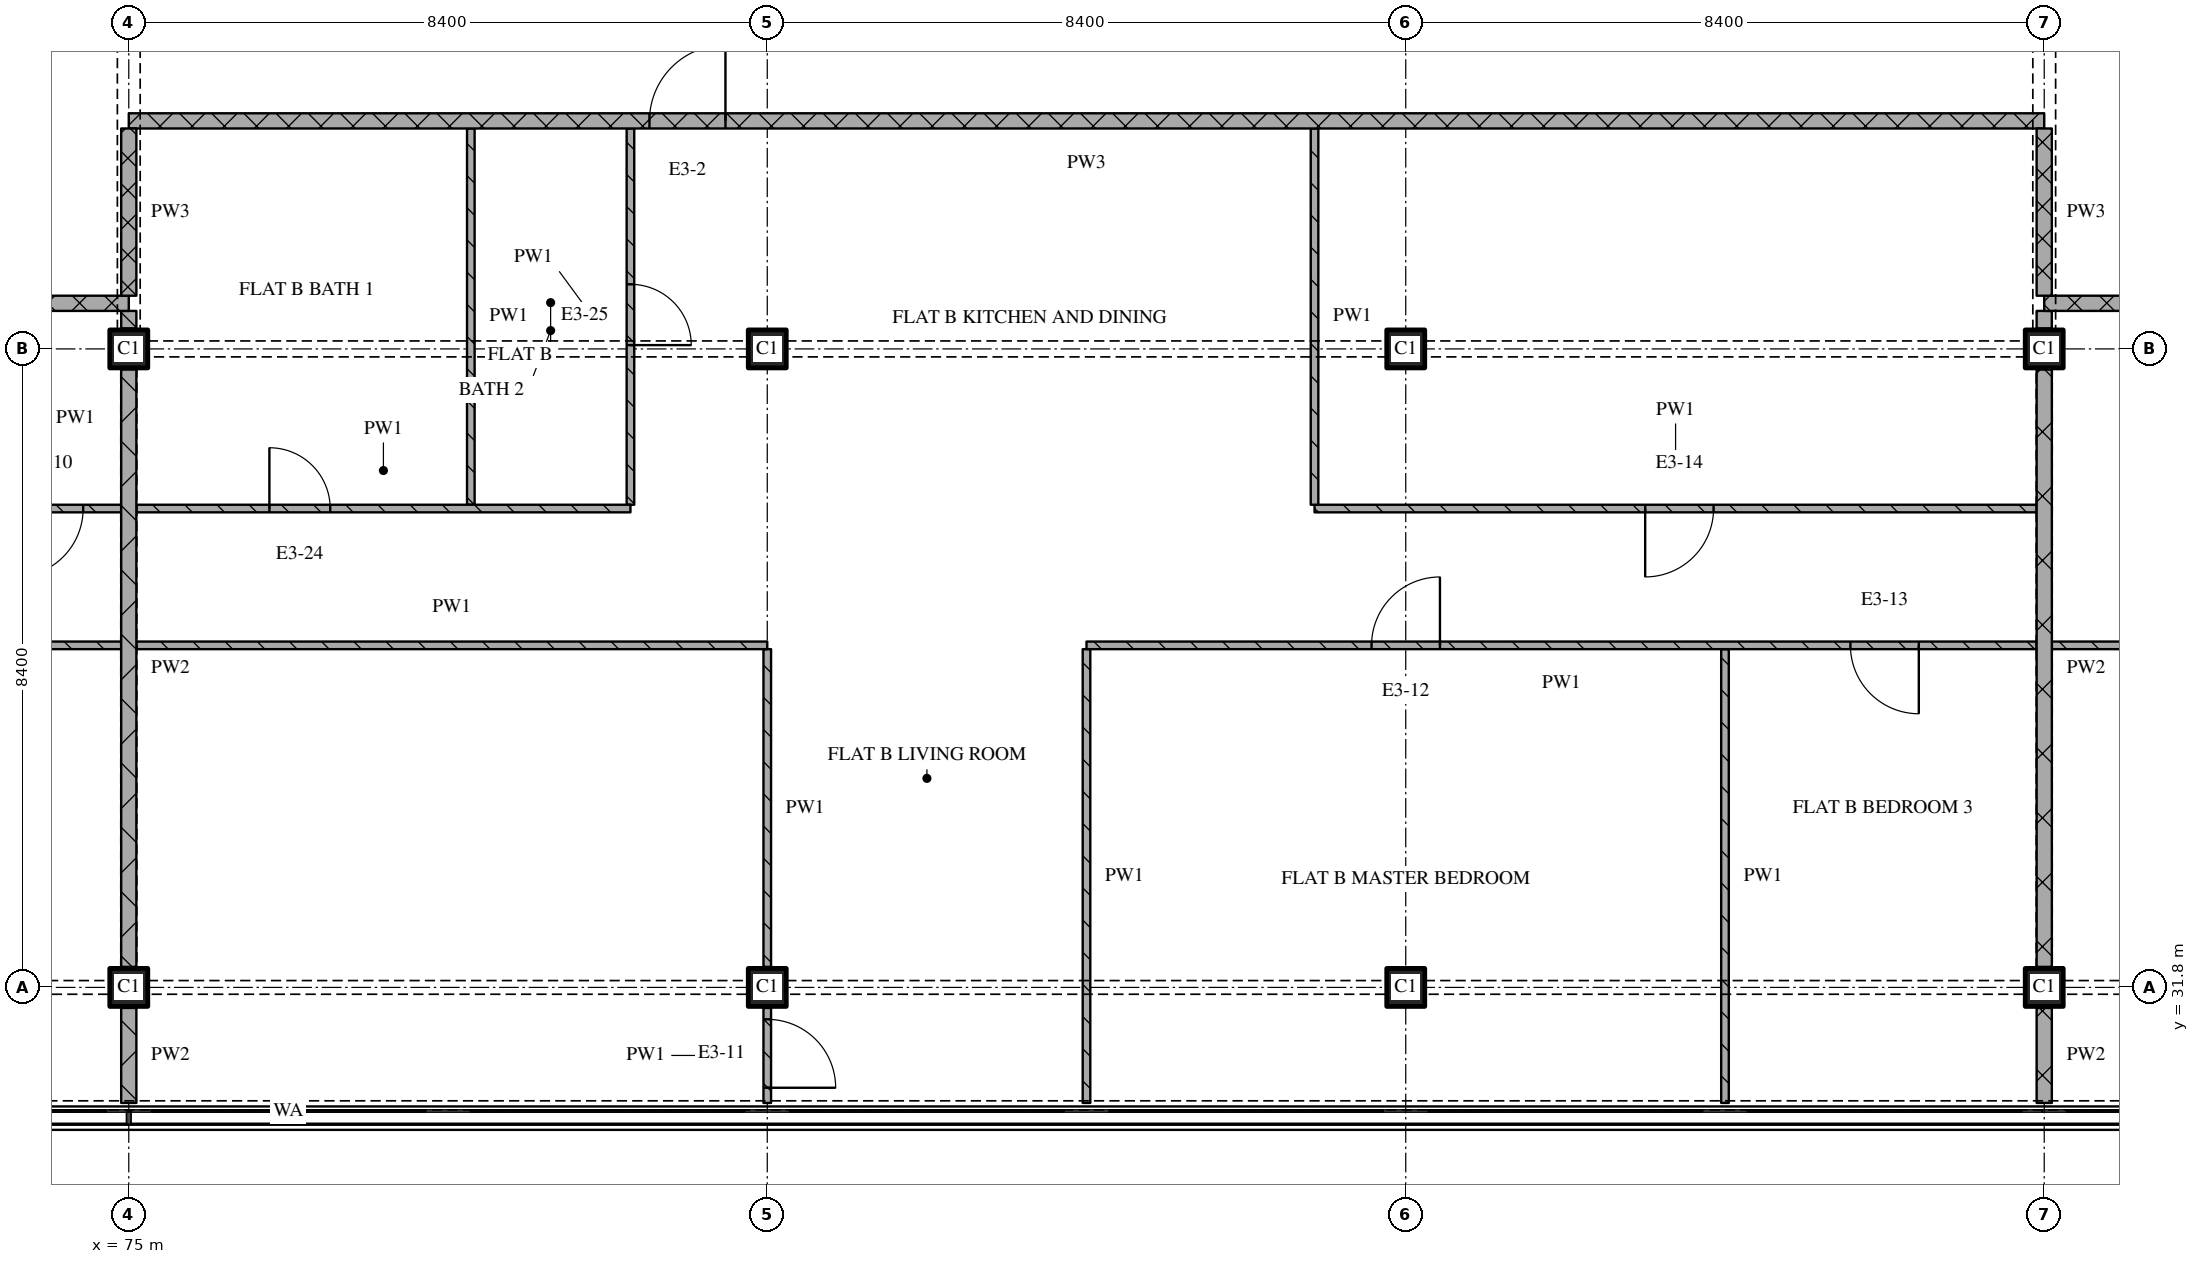
"""IFC4 building model, lengths in metres.
Left out: names, types, materials, properties, quantities, classifications, styles, units other than length and angle.
Written with IfcOpenShell. Run it as: python <this file> out.ifc"""

import sys

from ifc_helpers import new_model, si_unit, direction, frame, frame_2d, origin, origin_2d, place, context, subcontext, project, spatial, rectangle, extrude, element, fill, save


model = new_model("IFC4")
c1 = context("Model", 3, precision=1e-05, world=origin(), true_north=direction((0.0, 1.0)))
c2 = subcontext(c1, "Body", "Model", "MODEL_VIEW")
j1 = project(units=[si_unit("LENGTHUNIT", "METRE"), si_unit("PLANEANGLEUNIT", "RADIAN")], contexts=[c1])
p1 = place(None, origin())
s1 = spatial("IfcSite", under=j1, at=p1, CompositionType="ELEMENT")
p2 = place(p1, origin())
s2 = spatial("IfcBuilding", under=s1, at=p2, CompositionType="ELEMENT")
p3 = place(p2, frame((0.0, 0.0, 277.95)))
s3 = spatial("IfcBuildingStorey", under=s2, at=p3, CompositionType="ELEMENT", Elevation=277.95)
for number, where, z_axis, x_axis in (
    (1, (75.0, 31.8, 0.0), (0.0, 0.0, 1.0), (1.0, 0.0, 0.0)),
    (2, (75.0, 40.2, 0.0), (0.0, 0.0, 1.0), (1.0, 0.0, 0.0)),
    (3, (83.4, 31.8, 0.0), (0.0, 0.0, 1.0), (1.0, 0.0, 0.0)),
    (4, (83.4, 40.2, 0.0), (0.0, 0.0, 1.0), (1.0, 0.0, 0.0)),
    (5, (91.8, 31.8, 0.0), (0.0, 0.0, 1.0), (1.0, 0.0, 0.0)),
    (6, (91.8, 40.2, 0.0), (0.0, 0.0, 1.0), (1.0, 0.0, 0.0)),
    (7, (100.2, 31.8, 0.0), (0.0, 0.0, 1.0), (1.0, 0.0, 0.0)),
    (8, (100.2, 40.2, 0.0), (0.0, 0.0, 1.0), (1.0, 0.0, 0.0)),
):
    element("IfcColumn", number, at=place(p3, frame(where, z_axis=z_axis, x_axis=x_axis)), inside=s3, PredefinedType="COLUMN", context=c2, shape_type="SweptSolid", body=[
        extrude(rectangle(XDim=0.5, YDim=0.5, at=origin_2d()), origin(), (0.0, 0.0, 1.0), 3.6),
    ])
p4 = place(p3, frame((90.6, 38.1, 0.0), z_axis=(0.0, 0.0, 1.0), x_axis=(1.0, 0.0, 0.0)))
e9 = element("IfcWall", 9, at=p4, inside=s3, PredefinedType="PARTITIONING", context=c2, shape_type="SweptSolid", body=[
    extrude(rectangle(XDim=9.5, YDim=0.1, at=frame_2d((4.75, 0.0))), origin(), (0.0, 0.0, 1.0), 3.32),
])
p5 = place(p4, frame((4.35, 0.0, 0.0)))
e10 = element("IfcOpeningElement", 10, at=p5, cuts=e9, PredefinedType="OPENING", context=c2, shape_type="SweptSolid", body=[
    extrude(rectangle(XDim=0.9, YDim=2.1, at=frame_2d((0.45, 1.05))), frame((0.0, 0.06, 0.0), z_axis=(0.0, -1.0, 0.0), x_axis=(1.0, 0.0, 0.0)), (0.0, 0.0, 1.0), 0.12),
])
p6 = place(p3, frame((75.0, 40.8, 0.0), z_axis=(0.0, 0.0, 1.0), x_axis=(-1.0, 0.0, 0.0)))
e11 = element("IfcWall", 11, at=p6, inside=s3, PredefinedType="PARTITIONING", context=c2, shape_type="SweptSolid", body=[
    extrude(rectangle(XDim=18.32, YDim=0.2, at=frame_2d((9.16, 0.0))), origin(), (0.0, 0.0, 1.0), 3.32),
])
p7 = place(p6, frame((9.85, 0.0, 0.0)))
e12 = element("IfcOpeningElement", 12, at=p7, cuts=e11, PredefinedType="OPENING", context=c2, shape_type="SweptSolid", body=[
    extrude(rectangle(XDim=1.0, YDim=2.1, at=frame_2d((0.5, 1.05))), frame((0.0, 0.11, 0.0), z_axis=(0.0, -1.0, 0.0), x_axis=(1.0, 0.0, 0.0)), (0.0, 0.0, 1.0), 0.22),
])
p8 = place(p3, frame((118.52, 40.8, 0.0), z_axis=(0.0, 0.0, 1.0), x_axis=(-1.0, 0.0, 0.0)))
e13 = element("IfcWall", 13, at=p8, inside=s3, PredefinedType="PARTITIONING", context=c2, shape_type="SweptSolid", body=[
    extrude(rectangle(XDim=18.32, YDim=0.2, at=frame_2d((9.16, 0.0))), origin(), (0.0, 0.0, 1.0), 3.32),
])
p9 = place(p8, frame((7.77, 0.0, 0.0)))
e14 = element("IfcOpeningElement", 14, at=p9, cuts=e13, PredefinedType="OPENING", context=c2, shape_type="SweptSolid", body=[
    extrude(rectangle(XDim=1.0, YDim=2.1, at=frame_2d((0.5, 1.05))), frame((0.0, 0.11, 0.0), z_axis=(0.0, -1.0, 0.0), x_axis=(1.0, 0.0, 0.0)), (0.0, 0.0, 1.0), 0.22),
])
p10 = place(p3, frame((100.2, 43.2, 0.0), z_axis=(0.0, 0.0, 1.0), x_axis=(-1.0, 0.0, 0.0)))
e15 = element("IfcWall", 15, at=p10, inside=s3, PredefinedType="PARTITIONING", context=c2, shape_type="SweptSolid", body=[
    extrude(rectangle(XDim=25.2, YDim=0.2, at=frame_2d((12.6, 0.0))), origin(), (0.0, 0.0, 1.0), 3.32),
])
p11 = place(p10, frame((17.35, 0.0, 0.0)))
e16 = element("IfcOpeningElement", 16, at=p11, cuts=e15, PredefinedType="OPENING", context=c2, shape_type="SweptSolid", body=[
    extrude(rectangle(XDim=1.0, YDim=2.1, at=frame_2d((0.5, 1.05))), frame((0.0, 0.11, 0.0), z_axis=(0.0, -1.0, 0.0), x_axis=(1.0, 0.0, 0.0)), (0.0, 0.0, 1.0), 0.22),
])
p12 = place(p3, frame((75.0, 43.1, 0.0), z_axis=(0.0, 0.0, 1.0), x_axis=(0.0, -1.0, 0.0)))
e17 = element("IfcWall", 17, at=p12, inside=s3, PredefinedType="PARTITIONING", context=c2, shape_type="SweptSolid", body=[
    extrude(rectangle(XDim=2.2, YDim=0.2, at=frame_2d((1.1, 0.0))), origin(), (0.0, 0.0, 1.0), 2.53),
])
p13 = place(p3, frame((75.0, 31.53, 0.0), z_axis=(0.0, 0.0, 1.0), x_axis=(0.0, -1.0, 0.0)))
e18 = element("IfcWall", 18, at=p13, inside=s3, PredefinedType="PARTITIONING", context=c2, shape_type="SweptSolid", body=[
    extrude(rectangle(XDim=1.25, YDim=0.2, at=frame_2d((0.625, 0.0))), origin(), (0.0, 0.0, 1.0), 3.32),
])
p14 = place(p3, frame((75.0, 39.93, 0.0), z_axis=(0.0, 0.0, 1.0), x_axis=(0.0, -1.0, 0.0)))
e19 = element("IfcWall", 19, at=p14, inside=s3, PredefinedType="PARTITIONING", context=c2, shape_type="SweptSolid", body=[
    extrude(rectangle(XDim=7.86, YDim=0.2, at=frame_2d((3.93, 0.0))), origin(), (0.0, 0.0, 1.0), 2.77),
])
p15 = place(p3, frame((75.0, 40.7, 0.0), z_axis=(0.0, 0.0, 1.0), x_axis=(0.0, -1.0, 0.0)))
e20 = element("IfcWall", 20, at=p15, inside=s3, PredefinedType="PARTITIONING", context=c2, shape_type="SweptSolid", body=[
    extrude(rectangle(XDim=0.23, YDim=0.2, at=frame_2d((0.115, 0.0))), origin(), (0.0, 0.0, 1.0), 3.32),
])
p16 = place(p3, frame((79.5, 43.1, 0.0), z_axis=(0.0, 0.0, 1.0), x_axis=(0.0, -1.0, 0.0)))
e21 = element("IfcWall", 21, at=p16, inside=s3, PredefinedType="PARTITIONING", context=c2, shape_type="SweptSolid", body=[
    extrude(rectangle(XDim=4.95, YDim=0.1, at=frame_2d((2.475, 0.0))), origin(), (0.0, 0.0, 1.0), 3.32),
])
p17 = place(p3, frame((81.6, 38.15, 0.0), z_axis=(0.0, 0.0, 1.0), x_axis=(0.0, 1.0, 0.0)))
e22 = element("IfcWall", 22, at=p17, inside=s3, PredefinedType="PARTITIONING", context=c2, shape_type="SweptSolid", body=[
    extrude(rectangle(XDim=4.95, YDim=0.1, at=frame_2d((2.475, 0.0))), origin(), (0.0, 0.0, 1.0), 3.32),
])
p18 = place(p17, frame((2.1, 0.0, 0.0)))
e23 = element("IfcOpeningElement", 23, at=p18, cuts=e22, PredefinedType="OPENING", context=c2, shape_type="SweptSolid", body=[
    extrude(rectangle(XDim=0.8, YDim=2.1, at=frame_2d((0.4, 1.05))), frame((0.0, 0.06, 0.0), z_axis=(0.0, -1.0, 0.0), x_axis=(1.0, 0.0, 0.0)), (0.0, 0.0, 1.0), 0.12),
])
p19 = place(p3, frame((83.4, 30.28, 0.0), z_axis=(0.0, 0.0, 1.0), x_axis=(0.0, 1.0, 0.0)))
e24 = element("IfcWall", 24, at=p19, inside=s3, PredefinedType="PARTITIONING", context=c2, shape_type="SweptSolid", body=[
    extrude(rectangle(XDim=1.25, YDim=0.1, at=frame_2d((0.625, 0.0))), origin(), (0.0, 0.0, 1.0), 3.32),
])
p20 = place(p19, frame((0.2, 0.0, 0.0)))
e25 = element("IfcOpeningElement", 25, at=p20, cuts=e24, PredefinedType="OPENING", context=c2, shape_type="SweptSolid", body=[
    extrude(rectangle(XDim=0.9, YDim=2.1, at=frame_2d((0.45, 1.05))), frame((0.0, 0.06, 0.0), z_axis=(0.0, -1.0, 0.0), x_axis=(1.0, 0.0, 0.0)), (0.0, 0.0, 1.0), 0.12),
])
p21 = place(p3, frame((83.4, 36.25, 0.0), z_axis=(0.0, 0.0, 1.0), x_axis=(0.0, -1.0, 0.0)))
e26 = element("IfcWall", 26, at=p21, inside=s3, PredefinedType="PARTITIONING", context=c2, shape_type="SweptSolid", body=[
    extrude(rectangle(XDim=4.18, YDim=0.1, at=frame_2d((2.09, 0.0))), origin(), (0.0, 0.0, 1.0), 3.32),
])
p22 = place(p3, frame((87.6, 36.25, 0.0), z_axis=(0.0, 0.0, 1.0), x_axis=(0.0, -1.0, 0.0)))
e27 = element("IfcWall", 27, at=p22, inside=s3, PredefinedType="PARTITIONING", context=c2, shape_type="SweptSolid", body=[
    extrude(rectangle(XDim=5.97, YDim=0.1, at=frame_2d((2.985, 0.0))), origin(), (0.0, 0.0, 1.0), 3.32),
])
p23 = place(p3, frame((90.6, 43.1, 0.0), z_axis=(0.0, 0.0, 1.0), x_axis=(0.0, -1.0, 0.0)))
e28 = element("IfcWall", 28, at=p23, inside=s3, PredefinedType="PARTITIONING", context=c2, shape_type="SweptSolid", body=[
    extrude(rectangle(XDim=4.95, YDim=0.1, at=frame_2d((2.475, 0.0))), origin(), (0.0, 0.0, 1.0), 3.32),
])
p24 = place(p3, frame((96.0, 36.25, 0.0), z_axis=(0.0, 0.0, 1.0), x_axis=(0.0, -1.0, 0.0)))
e29 = element("IfcWall", 29, at=p24, inside=s3, PredefinedType="PARTITIONING", context=c2, shape_type="SweptSolid", body=[
    extrude(rectangle(XDim=5.97, YDim=0.1, at=frame_2d((2.985, 0.0))), origin(), (0.0, 0.0, 1.0), 3.32),
])
p25 = place(p3, frame((100.2, 43.1, 0.0), z_axis=(0.0, 0.0, 1.0), x_axis=(0.0, -1.0, 0.0)))
e30 = element("IfcWall", 30, at=p25, inside=s3, PredefinedType="PARTITIONING", context=c2, shape_type="SweptSolid", body=[
    extrude(rectangle(XDim=2.2, YDim=0.2, at=frame_2d((1.1, 0.0))), origin(), (0.0, 0.0, 1.0), 2.53),
])
p26 = place(p3, frame((100.2, 31.53, 0.0), z_axis=(0.0, 0.0, 1.0), x_axis=(0.0, -1.0, 0.0)))
e31 = element("IfcWall", 31, at=p26, inside=s3, PredefinedType="PARTITIONING", context=c2, shape_type="SweptSolid", body=[
    extrude(rectangle(XDim=1.25, YDim=0.2, at=frame_2d((0.625, 0.0))), origin(), (0.0, 0.0, 1.0), 3.32),
])
p27 = place(p3, frame((100.2, 39.93, 0.0), z_axis=(0.0, 0.0, 1.0), x_axis=(0.0, -1.0, 0.0)))
e32 = element("IfcWall", 32, at=p27, inside=s3, PredefinedType="PARTITIONING", context=c2, shape_type="SweptSolid", body=[
    extrude(rectangle(XDim=7.86, YDim=0.2, at=frame_2d((3.93, 0.0))), origin(), (0.0, 0.0, 1.0), 2.77),
])
p28 = place(p3, frame((100.2, 40.7, 0.0), z_axis=(0.0, 0.0, 1.0), x_axis=(0.0, -1.0, 0.0)))
e33 = element("IfcWall", 33, at=p28, inside=s3, PredefinedType="PARTITIONING", context=c2, shape_type="SweptSolid", body=[
    extrude(rectangle(XDim=0.23, YDim=0.2, at=frame_2d((0.115, 0.0))), origin(), (0.0, 0.0, 1.0), 3.32),
])
p29 = place(p3, frame((74.9, 36.3, 0.0), z_axis=(0.0, 0.0, 1.0), x_axis=(-1.0, 0.0, 0.0)))
e34 = element("IfcWall", 34, at=p29, inside=s3, PredefinedType="PARTITIONING", context=c2, shape_type="SweptSolid", body=[
    extrude(rectangle(XDim=8.3, YDim=0.1, at=frame_2d((4.15, 0.0))), origin(), (0.0, 0.0, 1.0), 3.32),
])
p30 = place(p29, frame((3.65, 0.0, 0.0)))
e35 = element("IfcOpeningElement", 35, at=p30, cuts=e34, PredefinedType="OPENING", context=c2, shape_type="SweptSolid", body=[
    extrude(rectangle(XDim=0.9, YDim=2.1, at=frame_2d((0.45, 1.05))), frame((0.0, 0.06, 0.0), z_axis=(0.0, -1.0, 0.0), x_axis=(1.0, 0.0, 0.0)), (0.0, 0.0, 1.0), 0.12),
])
p31 = place(p3, frame((75.1, 36.3, 0.0), z_axis=(0.0, 0.0, 1.0), x_axis=(1.0, 0.0, 0.0)))
e36 = element("IfcWall", 36, at=p31, inside=s3, PredefinedType="PARTITIONING", context=c2, shape_type="SweptSolid", body=[
    extrude(rectangle(XDim=8.3, YDim=0.1, at=frame_2d((4.15, 0.0))), origin(), (0.0, 0.0, 1.0), 3.32),
])
p32 = place(p3, frame((100.1, 36.3, 0.0), z_axis=(0.0, 0.0, 1.0), x_axis=(-1.0, 0.0, 0.0)))
e37 = element("IfcWall", 37, at=p32, inside=s3, PredefinedType="PARTITIONING", context=c2, shape_type="SweptSolid", body=[
    extrude(rectangle(XDim=12.5, YDim=0.1, at=frame_2d((6.25, 0.0))), origin(), (0.0, 0.0, 1.0), 3.32),
])
p33 = place(p32, frame((1.55, 0.0, 0.0)))
e38 = element("IfcOpeningElement", 38, at=p33, cuts=e37, PredefinedType="OPENING", context=c2, shape_type="SweptSolid", body=[
    extrude(rectangle(XDim=0.9, YDim=2.1, at=frame_2d((0.45, 1.05))), frame((0.0, 0.06, 0.0), z_axis=(0.0, -1.0, 0.0), x_axis=(1.0, 0.0, 0.0)), (0.0, 0.0, 1.0), 0.12),
])
p34 = place(p32, frame((7.85, 0.0, 0.0)))
e39 = element("IfcOpeningElement", 39, at=p34, cuts=e37, PredefinedType="OPENING", context=c2, shape_type="SweptSolid", body=[
    extrude(rectangle(XDim=0.9, YDim=2.1, at=frame_2d((0.45, 1.05))), frame((0.0, 0.06, 0.0), z_axis=(0.0, -1.0, 0.0), x_axis=(1.0, 0.0, 0.0)), (0.0, 0.0, 1.0), 0.12),
])
p35 = place(p3, frame((100.3, 36.3, 0.0), z_axis=(0.0, 0.0, 1.0), x_axis=(1.0, 0.0, 0.0)))
e40 = element("IfcWall", 40, at=p35, inside=s3, PredefinedType="PARTITIONING", context=c2, shape_type="SweptSolid", body=[
    extrude(rectangle(XDim=8.3, YDim=0.1, at=frame_2d((4.15, 0.0))), origin(), (0.0, 0.0, 1.0), 3.32),
])
p36 = place(p3, frame((72.9, 38.1, 0.0), z_axis=(0.0, 0.0, 1.0), x_axis=(1.0, 0.0, 0.0)))
e41 = element("IfcWall", 41, at=p36, inside=s3, PredefinedType="PARTITIONING", context=c2, shape_type="SweptSolid", body=[
    extrude(rectangle(XDim=2.0, YDim=0.1, at=frame_2d((1.0, 0.0))), origin(), (0.0, 0.0, 1.0), 3.32),
])
p37 = place(p36, frame((0.6, 0.0, 0.0)))
e42 = element("IfcOpeningElement", 42, at=p37, cuts=e41, PredefinedType="OPENING", context=c2, shape_type="SweptSolid", body=[
    extrude(rectangle(XDim=0.9, YDim=2.1, at=frame_2d((0.45, 1.05))), frame((0.0, 0.06, 0.0), z_axis=(0.0, -1.0, 0.0), x_axis=(1.0, 0.0, 0.0)), (0.0, 0.0, 1.0), 0.12),
])
p38 = place(p3, frame((75.1, 38.1, 0.0), z_axis=(0.0, 0.0, 1.0), x_axis=(1.0, 0.0, 0.0)))
e43 = element("IfcWall", 43, at=p38, inside=s3, PredefinedType="PARTITIONING", context=c2, shape_type="SweptSolid", body=[
    extrude(rectangle(XDim=6.5, YDim=0.1, at=frame_2d((3.25, 0.0))), origin(), (0.0, 0.0, 1.0), 3.32),
])
p39 = place(p38, frame((1.75, 0.0, 0.0)))
e44 = element("IfcOpeningElement", 44, at=p39, cuts=e43, PredefinedType="OPENING", context=c2, shape_type="SweptSolid", body=[
    extrude(rectangle(XDim=0.8, YDim=2.1, at=frame_2d((0.4, 1.05))), frame((0.0, 0.06, 0.0), z_axis=(0.0, -1.0, 0.0), x_axis=(1.0, 0.0, 0.0)), (0.0, 0.0, 1.0), 0.12),
])
p40 = place(p5, origin())
e45 = element("IfcDoor", 45, at=p40, inside=s3, OperationType="SINGLE_SWING_RIGHT", PredefinedType="DOOR", context=c2, shape_type="SweptSolid", body=[
    extrude(rectangle(XDim=0.9, YDim=2.1, at=frame_2d((0.45, 1.05))), frame((0.0, 0.025, 0.0), z_axis=(0.0, -1.0, 0.0), x_axis=(1.0, 0.0, 0.0)), (0.0, 0.0, 1.0), 0.05),
])
fill(e10, e45)
p41 = place(p11, origin())
e46 = element("IfcDoor", 46, at=p41, inside=s3, OperationType="SINGLE_SWING_RIGHT", PredefinedType="DOOR", context=c2, shape_type="SweptSolid", body=[
    extrude(rectangle(XDim=1.0, YDim=2.1, at=frame_2d((0.5, 1.05))), frame((0.0, 0.025, 0.0), z_axis=(0.0, -1.0, 0.0), x_axis=(1.0, 0.0, 0.0)), (0.0, 0.0, 1.0), 0.05),
])
fill(e16, e46)
p42 = place(p18, origin())
e47 = element("IfcDoor", 47, at=p42, inside=s3, OperationType="SINGLE_SWING_RIGHT", PredefinedType="DOOR", context=c2, shape_type="SweptSolid", body=[
    extrude(rectangle(XDim=0.8, YDim=2.1, at=frame_2d((0.4, 1.05))), frame((0.0, 0.025, 0.0), z_axis=(0.0, -1.0, 0.0), x_axis=(1.0, 0.0, 0.0)), (0.0, 0.0, 1.0), 0.05),
])
fill(e23, e47)
p43 = place(p20, origin())
e48 = element("IfcDoor", 48, at=p43, inside=s3, OperationType="SINGLE_SWING_RIGHT", PredefinedType="DOOR", context=c2, shape_type="SweptSolid", body=[
    extrude(rectangle(XDim=0.9, YDim=2.1, at=frame_2d((0.45, 1.05))), frame((0.0, 0.025, 0.0), z_axis=(0.0, -1.0, 0.0), x_axis=(1.0, 0.0, 0.0)), (0.0, 0.0, 1.0), 0.05),
])
fill(e25, e48)
p44 = place(p33, origin())
e49 = element("IfcDoor", 49, at=p44, inside=s3, OperationType="SINGLE_SWING_LEFT", PredefinedType="DOOR", context=c2, shape_type="SweptSolid", body=[
    extrude(rectangle(XDim=0.9, YDim=2.1, at=frame_2d((0.45, 1.05))), frame((0.0, 0.025, 0.0), z_axis=(0.0, -1.0, 0.0), x_axis=(1.0, 0.0, 0.0)), (0.0, 0.0, 1.0), 0.05),
])
fill(e38, e49)
p45 = place(p34, origin())
e50 = element("IfcDoor", 50, at=p45, inside=s3, OperationType="SINGLE_SWING_RIGHT", PredefinedType="DOOR", context=c2, shape_type="SweptSolid", body=[
    extrude(rectangle(XDim=0.9, YDim=2.1, at=frame_2d((0.45, 1.05))), frame((0.0, 0.025, 0.0), z_axis=(0.0, -1.0, 0.0), x_axis=(1.0, 0.0, 0.0)), (0.0, 0.0, 1.0), 0.05),
])
fill(e39, e50)
p46 = place(p37, origin())
e51 = element("IfcDoor", 51, at=p46, inside=s3, OperationType="SINGLE_SWING_RIGHT", PredefinedType="DOOR", context=c2, shape_type="SweptSolid", body=[
    extrude(rectangle(XDim=0.9, YDim=2.1, at=frame_2d((0.45, 1.05))), frame((0.0, 0.025, 0.0), z_axis=(0.0, -1.0, 0.0), x_axis=(1.0, 0.0, 0.0)), (0.0, 0.0, 1.0), 0.05),
])
fill(e42, e51)
p47 = place(p39, origin())
e52 = element("IfcDoor", 52, at=p47, inside=s3, OperationType="SINGLE_SWING_LEFT", PredefinedType="DOOR", context=c2, shape_type="SweptSolid", body=[
    extrude(rectangle(XDim=0.8, YDim=2.1, at=frame_2d((0.4, 1.05))), frame((0.0, 0.025, 0.0), z_axis=(0.0, -1.0, 0.0), x_axis=(1.0, 0.0, 0.0)), (0.0, 0.0, 1.0), 0.05),
])
fill(e44, e52)
save(model, sys.argv[1])
